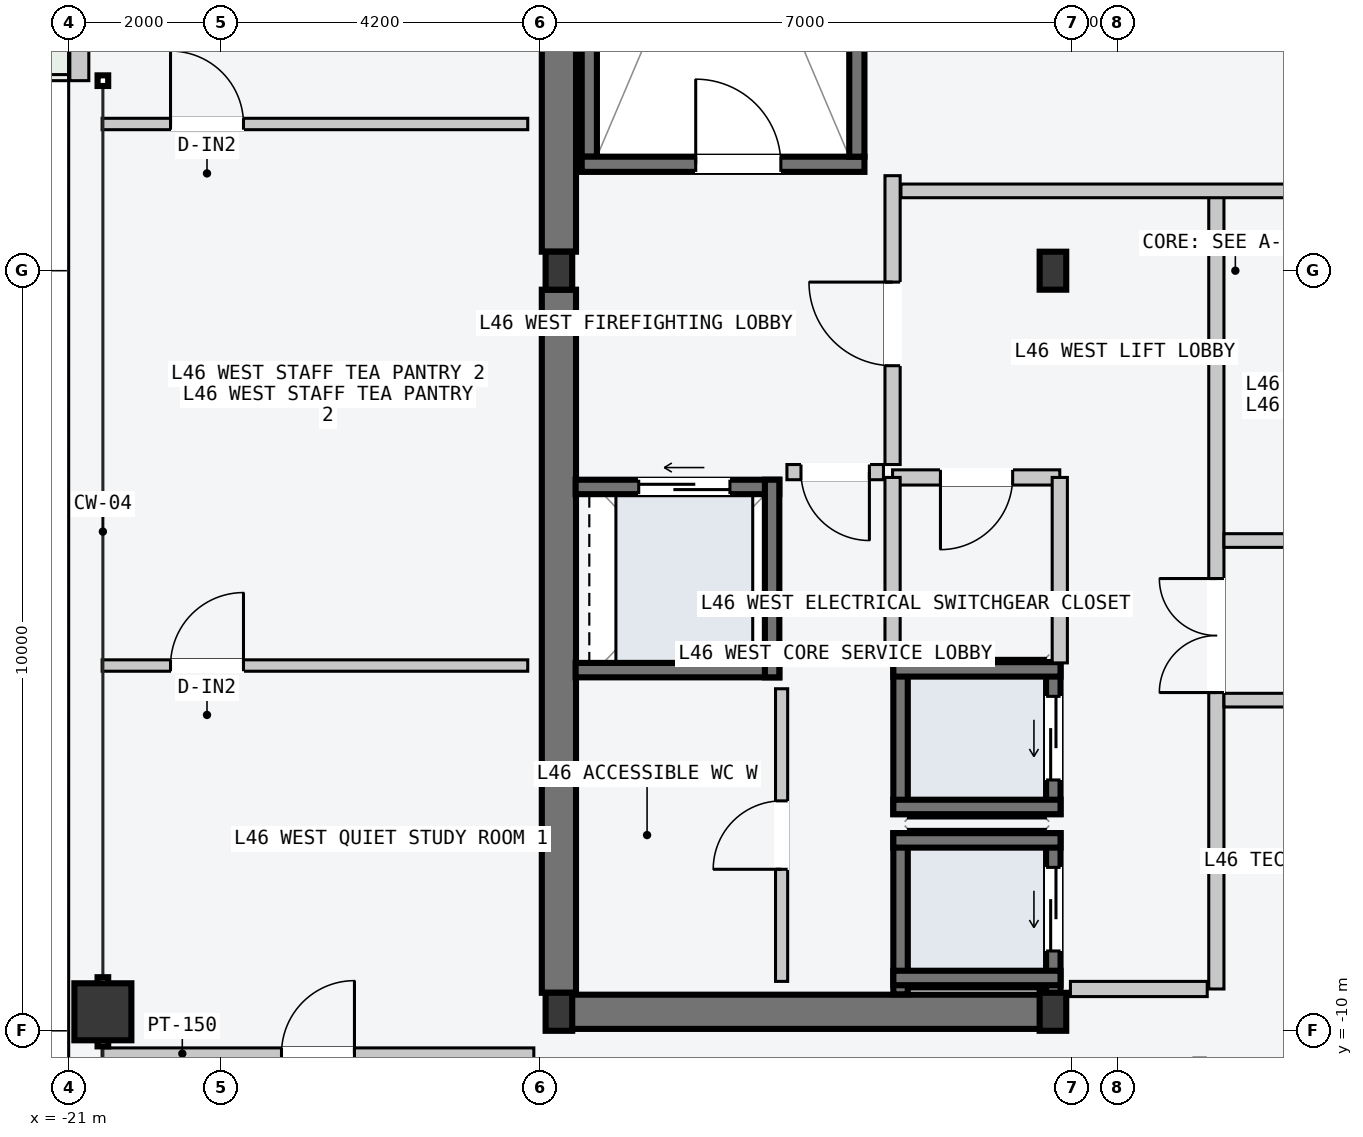
"""IFC4 building model, lengths in metres.
Left out: names, types, materials, properties, quantities, classifications, styles, units other than length and angle.
Written with IfcOpenShell. Run it as: python <this file> out.ifc"""

import sys

from ifc_helpers import new_model, si_unit, direction, frame, frame_2d, origin, origin_2d, place, context, subcontext, project, spatial, rectangle, hollow_rectangle, i_section, extrude, element, fill, save


model = new_model("IFC4")
c1 = context("Model", 3, precision=1e-05, world=origin(), true_north=direction((0.0, 1.0)))
c2 = subcontext(c1, "Body", "Model", "MODEL_VIEW")
j1 = project(units=[si_unit("LENGTHUNIT", "METRE"), si_unit("PLANEANGLEUNIT", "RADIAN")], contexts=[c1])
p1 = place(None, origin())
s1 = spatial("IfcSite", under=j1, at=p1, CompositionType="ELEMENT")
p2 = place(p1, origin())
s2 = spatial("IfcBuilding", under=s1, at=p2, CompositionType="ELEMENT")
p3 = place(p2, frame((0.0, 0.0, 176.7)))
s3 = spatial("IfcBuildingStorey", under=s2, at=p3, CompositionType="ELEMENT", Elevation=176.7)
p4 = place(p3, frame((-14.53, -9.75, -0.2), z_axis=(0.0, 0.0, 1.0), x_axis=(1.0, 0.0, 0.0)))
e1 = element("IfcWall", 1, at=p4, inside=s3, PredefinedType="SHEAR", context=c2, shape_type="SweptSolid", body=[
    extrude(rectangle(XDim=6.46, YDim=0.45, at=frame_2d((3.23, 0.0))), origin(), (0.0, 0.0, 1.0), 3.6),
])
for number, where, z_axis, x_axis in (
    (2, (-14.55, -9.5, -0.2), (0.0, 0.0, 1.0), (0.0, 1.0, 0.0)),
    (3, (-14.55, 0.25, -0.2), (0.0, 0.0, 1.0), (0.0, 1.0, 0.0)),
):
    element("IfcWall", number, at=place(p3, frame(where, z_axis=z_axis, x_axis=x_axis)), inside=s3, PredefinedType="SHEAR", context=c2, shape_type="SweptSolid", body=[
        extrude(rectangle(XDim=9.25, YDim=0.45, at=frame_2d((4.625, 0.0))), origin(), (0.0, 0.0, 1.0), 3.6),
    ])
p5 = place(p3, frame((-14.15, 1.5, -0.2), z_axis=(0.0, 0.0, 1.0), x_axis=(0.0, 1.0, 0.0)))
e4 = element("IfcWall", 4, at=p5, inside=s3, PredefinedType="SOLIDWALL", context=c2, shape_type="SweptSolid", body=[
    extrude(rectangle(XDim=7.8, YDim=0.2, at=frame_2d((3.9, 0.0))), origin(), (0.0, 0.0, 1.0), 3.6),
])
p6 = place(p3, frame((-14.25, 1.4, -0.2), z_axis=(0.0, 0.0, 1.0), x_axis=(1.0, 0.0, 0.0)))
e5 = element("IfcWall", 5, at=p6, inside=s3, PredefinedType="SOLIDWALL", context=c2, shape_type="SweptSolid", body=[
    extrude(rectangle(XDim=3.72, YDim=0.2, at=frame_2d((1.86, 0.0))), origin(), (0.0, 0.0, 1.0), 3.6),
])
p7 = place(p6, frame((1.5, 0.0, 0.2)))
e6 = element("IfcOpeningElement", 6, at=p7, cuts=e5, PredefinedType="OPENING", context=c2, shape_type="SweptSolid", body=[
    extrude(rectangle(XDim=1.12, YDim=2.18, at=frame_2d((0.56, 1.09))), frame((0.0, 0.11, 0.0), z_axis=(0.0, -1.0, 0.0), x_axis=(1.0, 0.0, 0.0)), (0.0, 0.0, 1.0), 0.22),
])
p8 = place(p3, frame((-10.63, 1.5, -0.2), z_axis=(0.0, 0.0, 1.0), x_axis=(0.0, 1.0, 0.0)))
e7 = element("IfcWall", 7, at=p8, inside=s3, PredefinedType="SOLIDWALL", context=c2, shape_type="SweptSolid", body=[
    extrude(rectangle(XDim=7.8, YDim=0.2, at=frame_2d((3.9, 0.0))), origin(), (0.0, 0.0, 1.0), 3.6),
])
for number, where, z_axis, x_axis in (
    (8, (-14.55, -9.75, 0.0), (0.0, 0.0, 1.0), (1.0, 0.0, 0.0)),
    (9, (-14.55, 0.0, 0.0), (0.0, 0.0, 1.0), (1.0, 0.0, 0.0)),
    (10, (-8.05, -9.75, 0.0), (0.0, 0.0, 1.0), (1.0, 0.0, 0.0)),
    (11, (-8.05, 0.0, 0.0), (0.0, 0.0, 1.0), (1.0, 0.0, 0.0)),
):
    element("IfcColumn", number, at=place(p3, frame(where, z_axis=z_axis, x_axis=x_axis)), inside=s3, PredefinedType="COLUMN", context=c2, shape_type="SweptSolid", body=[
        extrude(i_section(OverallWidth=0.35, OverallDepth=0.5, WebThickness=0.02, FlangeThickness=0.032, at=origin_2d()), origin(), (0.0, 0.0, 1.0), 3.6),
    ])
p9 = place(p3, frame((-20.55, -9.75, 0.0), z_axis=(0.0, 0.0, 1.0), x_axis=(0.0, 1.0, 0.0)))
e12 = element("IfcColumn", 12, at=p9, inside=s3, PredefinedType="COLUMN", context=c2, shape_type="SweptSolid", body=[
    extrude(hollow_rectangle(XDim=0.75, YDim=0.75, WallThickness=0.032, at=origin_2d()), origin(), (0.0, 0.0, 1.0), 3.6),
])
p10 = place(p3, frame((-20.86, 2.5, 0.0), z_axis=(0.0, 0.0, 1.0), x_axis=(0.0, 1.0, 0.0)))
e13 = element("IfcWall", 13, at=p10, inside=s3, PredefinedType="STANDARD", context=c2, shape_type="SweptSolid", body=[
    extrude(rectangle(XDim=6.855, YDim=0.25, at=frame_2d((3.427, 0.0))), origin(), (0.0, 0.0, 1.0), 3.4),
])
p11 = place(p10, frame((1.7, 0.0, 0.0)))
e14 = element("IfcOpeningElement", 14, at=p11, cuts=e13, PredefinedType="OPENING", context=c2, shape_type="SweptSolid", body=[
    extrude(rectangle(XDim=1.6, YDim=2.2, at=frame_2d((0.8, 1.1))), frame((0.0, 0.135, 0.0), z_axis=(0.0, -1.0, 0.0), x_axis=(1.0, 0.0, 0.0)), (0.0, 0.0, 1.0), 0.27),
])
p12 = place(p10, frame((4.1, 0.0, 0.85)))
e15 = element("IfcOpeningElement", 15, at=p12, cuts=e13, PredefinedType="OPENING", context=c2, shape_type="SweptSolid", body=[
    extrude(rectangle(XDim=2.0, YDim=2.1, at=frame_2d((1.0, 1.05))), frame((0.0, 0.135, 0.0), z_axis=(0.0, -1.0, 0.0), x_axis=(1.0, 0.0, 0.0)), (0.0, 0.0, 1.0), 0.27),
])
p13 = place(p3, frame((-8.045, -9.52, -0.2), z_axis=(0.0, 0.0, 1.0), x_axis=(0.0, 1.0, 0.0)))
e16 = element("IfcWall", 16, at=p13, inside=s3, PredefinedType="SOLIDWALL", context=c2, shape_type="SweptSolid", body=[
    extrude(rectangle(XDim=2.12, YDim=0.19, at=frame_2d((1.06, 0.0))), origin(), (0.0, 0.0, 1.0), 3.6),
])
p14 = place(p13, frame((0.57, 0.0, 0.2)))
e17 = element("IfcOpeningElement", 17, at=p14, cuts=e16, PredefinedType="OPENING", context=c2, shape_type="SweptSolid", body=[
    extrude(rectangle(XDim=1.1, YDim=2.2, at=frame_2d((0.55, 1.1))), frame((0.0, 0.105, 0.0), z_axis=(0.0, -1.0, 0.0), x_axis=(1.0, 0.0, 0.0)), (0.0, 0.0, 1.0), 0.21),
])
p15 = place(p3, frame((-10.055, -9.52, -0.2), z_axis=(0.0, 0.0, 1.0), x_axis=(0.0, 1.0, 0.0)))
e18 = element("IfcWall", 18, at=p15, inside=s3, PredefinedType="SOLIDWALL", context=c2, shape_type="SweptSolid", body=[
    extrude(rectangle(XDim=2.12, YDim=0.19, at=frame_2d((1.06, 0.0))), origin(), (0.0, 0.0, 1.0), 3.6),
])
for number, where, z_axis, x_axis in (
    (19, (-10.15, -7.495, -0.2), (0.0, 0.0, 1.0), (1.0, 0.0, 0.0)),
    (20, (-10.15, -9.305, -0.2), (0.0, 0.0, 1.0), (1.0, 0.0, 0.0)),
):
    element("IfcWall", number, at=place(p3, frame(where, z_axis=z_axis, x_axis=x_axis)), inside=s3, PredefinedType="SOLIDWALL", context=c2, shape_type="SweptSolid", body=[
        extrude(rectangle(XDim=2.2, YDim=0.19, at=frame_2d((1.1, 0.0))), origin(), (0.0, 0.0, 1.0), 3.6),
    ])
p16 = place(p3, frame((-8.045, -7.15, -0.2), z_axis=(0.0, 0.0, 1.0), x_axis=(0.0, 1.0, 0.0)))
e21 = element("IfcWall", 21, at=p16, inside=s3, PredefinedType="SOLIDWALL", context=c2, shape_type="SweptSolid", body=[
    extrude(rectangle(XDim=2.0, YDim=0.19, at=frame_2d((1.0, 0.0))), origin(), (0.0, 0.0, 1.0), 3.6),
])
p17 = place(p16, frame((0.45, 0.0, 0.2)))
e22 = element("IfcOpeningElement", 22, at=p17, cuts=e21, PredefinedType="OPENING", context=c2, shape_type="SweptSolid", body=[
    extrude(rectangle(XDim=1.1, YDim=2.2, at=frame_2d((0.55, 1.1))), frame((0.0, 0.105, 0.0), z_axis=(0.0, -1.0, 0.0), x_axis=(1.0, 0.0, 0.0)), (0.0, 0.0, 1.0), 0.21),
])
p18 = place(p3, frame((-10.055, -7.15, -0.2), z_axis=(0.0, 0.0, 1.0), x_axis=(0.0, 1.0, 0.0)))
e23 = element("IfcWall", 23, at=p18, inside=s3, PredefinedType="SOLIDWALL", context=c2, shape_type="SweptSolid", body=[
    extrude(rectangle(XDim=2.0, YDim=0.19, at=frame_2d((1.0, 0.0))), origin(), (0.0, 0.0, 1.0), 3.6),
])
for number, where, z_axis, x_axis in (
    (24, (-10.15, -5.245, -0.2), (0.0, 0.0, 1.0), (1.0, 0.0, 0.0)),
    (25, (-10.15, -7.055, -0.2), (0.0, 0.0, 1.0), (1.0, 0.0, 0.0)),
):
    element("IfcWall", number, at=place(p3, frame(where, z_axis=z_axis, x_axis=x_axis)), inside=s3, PredefinedType="SOLIDWALL", context=c2, shape_type="SweptSolid", body=[
        extrude(rectangle(XDim=2.2, YDim=0.19, at=frame_2d((1.1, 0.0))), origin(), (0.0, 0.0, 1.0), 3.6),
    ])
p19 = place(p3, frame((-14.33, -2.845, -0.2), z_axis=(0.0, 0.0, 1.0), x_axis=(1.0, 0.0, 0.0)))
e26 = element("IfcWall", 26, at=p19, inside=s3, PredefinedType="SOLIDWALL", context=c2, shape_type="SweptSolid", body=[
    extrude(rectangle(XDim=2.68, YDim=0.19, at=frame_2d((1.34, 0.0))), origin(), (0.0, 0.0, 1.0), 3.6),
])
p20 = place(p19, frame((0.83, 0.0, 0.2)))
e27 = element("IfcOpeningElement", 27, at=p20, cuts=e26, PredefinedType="OPENING", context=c2, shape_type="SweptSolid", body=[
    extrude(rectangle(XDim=1.2, YDim=2.2, at=frame_2d((0.6, 1.1))), frame((0.0, 0.105, 0.0), z_axis=(0.0, -1.0, 0.0), x_axis=(1.0, 0.0, 0.0)), (0.0, 0.0, 1.0), 0.21),
])
p21 = place(p3, frame((-14.33, -5.255, -0.2), z_axis=(0.0, 0.0, 1.0), x_axis=(1.0, 0.0, 0.0)))
e28 = element("IfcWall", 28, at=p21, inside=s3, PredefinedType="SOLIDWALL", context=c2, shape_type="SweptSolid", body=[
    extrude(rectangle(XDim=2.68, YDim=0.19, at=frame_2d((1.34, 0.0))), origin(), (0.0, 0.0, 1.0), 3.6),
])
p22 = place(p3, frame((-11.745, -5.35, -0.2), z_axis=(0.0, 0.0, 1.0), x_axis=(0.0, 1.0, 0.0)))
e29 = element("IfcWall", 29, at=p22, inside=s3, PredefinedType="SOLIDWALL", context=c2, shape_type="SweptSolid", body=[
    extrude(rectangle(XDim=2.6, YDim=0.19, at=frame_2d((1.3, 0.0))), origin(), (0.0, 0.0, 1.0), 3.6),
])
p23 = place(p3, frame((-5.9, -9.45, 0.0), z_axis=(0.0, 0.0, 1.0), x_axis=(0.0, 1.0, 0.0)))
e30 = element("IfcWall", 30, at=p23, inside=s3, PredefinedType="PARTITIONING", context=c2, shape_type="SweptSolid", body=[
    extrude(rectangle(XDim=10.5, YDim=0.2, at=frame_2d((5.25, 0.0))), origin(), (0.0, 0.0, 1.0), 3.4),
])
p24 = place(p23, frame((3.9, 0.0, 0.0)))
e31 = element("IfcOpeningElement", 31, at=p24, cuts=e30, PredefinedType="OPENING", context=c2, shape_type="SweptSolid", body=[
    extrude(rectangle(XDim=1.5, YDim=2.2, at=frame_2d((0.75, 1.1))), frame((0.0, 0.11, 0.0), z_axis=(0.0, -1.0, 0.0), x_axis=(1.0, 0.0, 0.0)), (0.0, 0.0, 1.0), 0.22),
])
p25 = place(p3, frame((-6.02, -9.45, 0.0), z_axis=(0.0, 0.0, 1.0), x_axis=(-1.0, 0.0, 0.0)))
e32 = element("IfcWall", 32, at=p25, inside=s3, PredefinedType="PARTITIONING", context=c2, shape_type="SweptSolid", body=[
    extrude(rectangle(XDim=1.8, YDim=0.2, at=frame_2d((0.9, 0.0))), origin(), (0.0, 0.0, 1.0), 3.4),
])
p26 = place(p3, frame((-10.16, -2.55, 0.0), z_axis=(0.0, 0.0, 1.0), x_axis=(0.0, 1.0, 0.0)))
e33 = element("IfcWall", 33, at=p26, inside=s3, PredefinedType="PARTITIONING", context=c2, shape_type="SweptSolid", body=[
    extrude(rectangle(XDim=3.8, YDim=0.2, at=frame_2d((1.9, 0.0))), origin(), (0.0, 0.0, 1.0), 3.4),
])
p27 = place(p26, frame((1.3, 0.0, 0.0)))
e34 = element("IfcOpeningElement", 34, at=p27, cuts=e33, PredefinedType="OPENING", context=c2, shape_type="SweptSolid", body=[
    extrude(rectangle(XDim=1.1, YDim=2.15, at=frame_2d((0.55, 1.075))), frame((0.0, 0.11, 0.0), z_axis=(0.0, -1.0, 0.0), x_axis=(1.0, 0.0, 0.0)), (0.0, 0.0, 1.0), 0.22),
])
p28 = place(p3, frame((-10.28, -2.65, 0.0), z_axis=(0.0, 0.0, 1.0), x_axis=(-1.0, 0.0, 0.0)))
e35 = element("IfcWall", 35, at=p28, inside=s3, PredefinedType="PARTITIONING", context=c2, shape_type="SweptSolid", body=[
    extrude(rectangle(XDim=1.27, YDim=0.2, at=frame_2d((0.635, 0.0))), origin(), (0.0, 0.0, 1.0), 3.4),
])
p29 = place(p28, frame((0.185, 0.0, 0.0)))
e36 = element("IfcOpeningElement", 36, at=p29, cuts=e35, PredefinedType="OPENING", context=c2, shape_type="SweptSolid", body=[
    extrude(rectangle(XDim=0.9, YDim=2.15, at=frame_2d((0.45, 1.075))), frame((0.0, 0.11, 0.0), z_axis=(0.0, -1.0, 0.0), x_axis=(1.0, 0.0, 0.0)), (0.0, 0.0, 1.0), 0.22),
])
p30 = place(p3, frame((-7.96, -2.72, 0.0), z_axis=(0.0, 0.0, 1.0), x_axis=(-1.0, 0.0, 0.0)))
e37 = element("IfcWall", 37, at=p30, inside=s3, PredefinedType="PARTITIONING", context=c2, shape_type="SweptSolid", body=[
    extrude(rectangle(XDim=2.2, YDim=0.2, at=frame_2d((1.1, 0.0))), origin(), (0.0, 0.0, 1.0), 3.4),
])
p31 = place(p30, frame((0.62, 0.0, 0.0)))
e38 = element("IfcOpeningElement", 38, at=p31, cuts=e37, PredefinedType="OPENING", context=c2, shape_type="SweptSolid", body=[
    extrude(rectangle(XDim=0.95, YDim=2.1, at=frame_2d((0.475, 1.05))), frame((0.0, 0.11, 0.0), z_axis=(0.0, -1.0, 0.0), x_axis=(1.0, 0.0, 0.0)), (0.0, 0.0, 1.0), 0.22),
])
for number, where, z_axis, x_axis in (
    (39, (-7.96, -5.16, 0.0), (0.0, 0.0, 1.0), (0.0, 1.0, 0.0)),
    (40, (-10.16, -5.16, 0.0), (0.0, 0.0, 1.0), (0.0, 1.0, 0.0)),
):
    element("IfcWall", number, at=place(p3, frame(where, z_axis=z_axis, x_axis=x_axis)), inside=s3, PredefinedType="PARTITIONING", context=c2, shape_type="SweptSolid", body=[
        extrude(rectangle(XDim=2.44, YDim=0.2, at=frame_2d((1.22, 0.0))), origin(), (0.0, 0.0, 1.0), 3.4),
    ])
p32 = place(p3, frame((-11.62, -9.35, 0.0), z_axis=(0.0, 0.0, 1.0), x_axis=(0.0, 1.0, 0.0)))
e41 = element("IfcWall", 41, at=p32, inside=s3, PredefinedType="PARTITIONING", context=c2, shape_type="SweptSolid", body=[
    extrude(rectangle(XDim=3.85, YDim=0.16, at=frame_2d((1.925, 0.0))), origin(), (0.0, 0.0, 1.0), 3.4),
])
p33 = place(p32, frame((1.475, 0.0, 0.0)))
e42 = element("IfcOpeningElement", 42, at=p33, cuts=e41, PredefinedType="OPENING", context=c2, shape_type="SweptSolid", body=[
    extrude(rectangle(XDim=0.9, YDim=2.15, at=frame_2d((0.45, 1.075))), frame((0.0, 0.09, 0.0), z_axis=(0.0, -1.0, 0.0), x_axis=(1.0, 0.0, 0.0)), (0.0, 0.0, 1.0), 0.18),
])
p34 = place(p3, frame((-10.05, 1.05, 0.0), z_axis=(0.0, 0.0, 1.0), x_axis=(1.0, 0.0, 0.0)))
e43 = element("IfcWall", 43, at=p34, inside=s3, PredefinedType="PARTITIONING", context=c2, shape_type="SweptSolid", body=[
    extrude(rectangle(XDim=8.79, YDim=0.18, at=frame_2d((4.395, 0.0))), origin(), (0.0, 0.0, 1.0), 3.4),
])
for number, where, z_axis, x_axis in (
    (44, (-5.8, -3.55, 0.0), (0.0, 0.0, 1.0), (1.0, 0.0, 0.0)),
    (45, (-5.8, -5.65, 0.0), (0.0, 0.0, 1.0), (1.0, 0.0, 0.0)),
):
    element("IfcWall", number, at=place(p3, frame(where, z_axis=z_axis, x_axis=x_axis)), inside=s3, PredefinedType="PARTITIONING", context=c2, shape_type="SweptSolid", body=[
        extrude(rectangle(XDim=4.54, YDim=0.18, at=frame_2d((2.27, 0.0))), origin(), (0.0, 0.0, 1.0), 3.4),
    ])
p35 = place(p3, frame((-20.56, -10.3, 0.0), z_axis=(0.0, 0.0, 1.0), x_axis=(1.0, 0.0, 0.0)))
e46 = element("IfcWall", 46, at=p35, inside=s3, PredefinedType="PARTITIONING", context=c2, shape_type="SweptSolid", body=[
    extrude(rectangle(XDim=5.68, YDim=0.15, at=frame_2d((2.84, 0.0))), origin(), (0.0, 0.0, 1.0), 3.4),
])
p36 = place(p35, frame((2.36, 0.0, 0.0)))
e47 = element("IfcOpeningElement", 47, at=p36, cuts=e46, PredefinedType="OPENING", context=c2, shape_type="SweptSolid", body=[
    extrude(rectangle(XDim=0.96, YDim=2.18, at=frame_2d((0.48, 1.09))), frame((0.0, 0.085, 0.0), z_axis=(0.0, -1.0, 0.0), x_axis=(1.0, 0.0, 0.0)), (0.0, 0.0, 1.0), 0.17),
])
p37 = place(p3, frame((-20.56, -5.195, 0.0), z_axis=(0.0, 0.0, 1.0), x_axis=(1.0, 0.0, 0.0)))
e48 = element("IfcWall", 48, at=p37, inside=s3, PredefinedType="PARTITIONING", context=c2, shape_type="SweptSolid", body=[
    extrude(rectangle(XDim=5.6, YDim=0.15, at=frame_2d((2.8, 0.0))), origin(), (0.0, 0.0, 1.0), 3.4),
])
p38 = place(p37, frame((0.9, 0.0, 0.0)))
e49 = element("IfcOpeningElement", 49, at=p38, cuts=e48, PredefinedType="OPENING", context=c2, shape_type="SweptSolid", body=[
    extrude(rectangle(XDim=0.96, YDim=2.18, at=frame_2d((0.48, 1.09))), frame((0.0, 0.085, 0.0), z_axis=(0.0, -1.0, 0.0), x_axis=(1.0, 0.0, 0.0)), (0.0, 0.0, 1.0), 0.17),
])
p39 = place(p3, frame((-20.56, 1.93, 0.0), z_axis=(0.0, 0.0, 1.0), x_axis=(1.0, 0.0, 0.0)))
e50 = element("IfcWall", 50, at=p39, inside=s3, PredefinedType="PARTITIONING", context=c2, shape_type="SweptSolid", body=[
    extrude(rectangle(XDim=5.6, YDim=0.15, at=frame_2d((2.8, 0.0))), origin(), (0.0, 0.0, 1.0), 3.4),
])
p40 = place(p39, frame((0.9, 0.0, 0.0)))
e51 = element("IfcOpeningElement", 51, at=p40, cuts=e50, PredefinedType="OPENING", context=c2, shape_type="SweptSolid", body=[
    extrude(rectangle(XDim=0.96, YDim=2.18, at=frame_2d((0.48, 1.09))), frame((0.0, 0.085, 0.0), z_axis=(0.0, -1.0, 0.0), x_axis=(1.0, 0.0, 0.0)), (0.0, 0.0, 1.0), 0.17),
])
p41 = place(p7, origin())
e52 = element("IfcDoor", 52, at=p41, inside=s3, OperationType="SINGLE_SWING_LEFT", PredefinedType="DOOR", context=c2, shape_type="SweptSolid", body=[
    extrude(rectangle(XDim=1.12, YDim=2.18, at=frame_2d((0.56, 1.09))), frame((0.0, 0.025, 0.0), z_axis=(0.0, -1.0, 0.0), x_axis=(1.0, 0.0, 0.0)), (0.0, 0.0, 1.0), 0.05),
])
fill(e6, e52)
p42 = place(p14, origin())
e53 = element("IfcDoor", 53, at=p42, inside=s3, OperationType="SLIDING_TO_LEFT", PredefinedType="DOOR", context=c2, shape_type="SweptSolid", body=[
    extrude(rectangle(XDim=1.1, YDim=2.2, at=frame_2d((0.55, 1.1))), frame((0.0, 0.025, 0.0), z_axis=(0.0, -1.0, 0.0), x_axis=(1.0, 0.0, 0.0)), (0.0, 0.0, 1.0), 0.05),
])
fill(e17, e53)
p43 = place(p17, origin())
e54 = element("IfcDoor", 54, at=p43, inside=s3, OperationType="SLIDING_TO_LEFT", PredefinedType="DOOR", context=c2, shape_type="SweptSolid", body=[
    extrude(rectangle(XDim=1.1, YDim=2.2, at=frame_2d((0.55, 1.1))), frame((0.0, 0.025, 0.0), z_axis=(0.0, -1.0, 0.0), x_axis=(1.0, 0.0, 0.0)), (0.0, 0.0, 1.0), 0.05),
])
fill(e22, e54)
p44 = place(p20, origin())
e55 = element("IfcDoor", 55, at=p44, inside=s3, OperationType="SLIDING_TO_LEFT", PredefinedType="DOOR", context=c2, shape_type="SweptSolid", body=[
    extrude(rectangle(XDim=1.2, YDim=2.2, at=frame_2d((0.6, 1.1))), frame((0.0, 0.025, 0.0), z_axis=(0.0, -1.0, 0.0), x_axis=(1.0, 0.0, 0.0)), (0.0, 0.0, 1.0), 0.05),
])
fill(e27, e55)
p45 = place(p24, origin())
e56 = element("IfcDoor", 56, at=p45, inside=s3, OperationType="DOUBLE_DOOR_SINGLE_SWING", PredefinedType="DOOR", context=c2, shape_type="SweptSolid", body=[
    extrude(rectangle(XDim=1.5, YDim=2.2, at=frame_2d((0.75, 1.1))), frame((0.0, 0.025, 0.0), z_axis=(0.0, -1.0, 0.0), x_axis=(1.0, 0.0, 0.0)), (0.0, 0.0, 1.0), 0.05),
])
fill(e31, e56)
p46 = place(p27, origin())
e57 = element("IfcDoor", 57, at=p46, inside=s3, OperationType="SINGLE_SWING_RIGHT", PredefinedType="DOOR", context=c2, shape_type="SweptSolid", body=[
    extrude(rectangle(XDim=1.1, YDim=2.15, at=frame_2d((0.55, 1.075))), frame((0.0, 0.025, 0.0), z_axis=(0.0, -1.0, 0.0), x_axis=(1.0, 0.0, 0.0)), (0.0, 0.0, 1.0), 0.05),
])
fill(e34, e57)
p47 = place(p29, origin())
e58 = element("IfcDoor", 58, at=p47, inside=s3, OperationType="SINGLE_SWING_LEFT", PredefinedType="DOOR", context=c2, shape_type="SweptSolid", body=[
    extrude(rectangle(XDim=0.9, YDim=2.15, at=frame_2d((0.45, 1.075))), frame((0.0, 0.025, 0.0), z_axis=(0.0, -1.0, 0.0), x_axis=(1.0, 0.0, 0.0)), (0.0, 0.0, 1.0), 0.05),
])
fill(e36, e58)
p48 = place(p31, origin())
e59 = element("IfcDoor", 59, at=p48, inside=s3, OperationType="SINGLE_SWING_RIGHT", PredefinedType="DOOR", context=c2, shape_type="SweptSolid", body=[
    extrude(rectangle(XDim=0.95, YDim=2.1, at=frame_2d((0.475, 1.05))), frame((0.0, 0.025, 0.0), z_axis=(0.0, -1.0, 0.0), x_axis=(1.0, 0.0, 0.0)), (0.0, 0.0, 1.0), 0.05),
])
fill(e38, e59)
p49 = place(p33, origin())
e60 = element("IfcDoor", 60, at=p49, inside=s3, OperationType="SINGLE_SWING_LEFT", PredefinedType="DOOR", context=c2, shape_type="SweptSolid", body=[
    extrude(rectangle(XDim=0.9, YDim=2.15, at=frame_2d((0.45, 1.075))), frame((0.0, 0.025, 0.0), z_axis=(0.0, -1.0, 0.0), x_axis=(1.0, 0.0, 0.0)), (0.0, 0.0, 1.0), 0.05),
])
fill(e42, e60)
p50 = place(p36, origin())
e61 = element("IfcDoor", 61, at=p50, inside=s3, OperationType="SINGLE_SWING_RIGHT", PredefinedType="DOOR", context=c2, shape_type="SweptSolid", body=[
    extrude(rectangle(XDim=0.96, YDim=2.18, at=frame_2d((0.48, 1.09))), frame((0.0, 0.025, 0.0), z_axis=(0.0, -1.0, 0.0), x_axis=(1.0, 0.0, 0.0)), (0.0, 0.0, 1.0), 0.05),
])
fill(e47, e61)
p51 = place(p38, origin())
e62 = element("IfcDoor", 62, at=p51, inside=s3, OperationType="SINGLE_SWING_RIGHT", PredefinedType="DOOR", context=c2, shape_type="SweptSolid", body=[
    extrude(rectangle(XDim=0.96, YDim=2.18, at=frame_2d((0.48, 1.09))), frame((0.0, 0.025, 0.0), z_axis=(0.0, -1.0, 0.0), x_axis=(1.0, 0.0, 0.0)), (0.0, 0.0, 1.0), 0.05),
])
fill(e49, e62)
p52 = place(p40, origin())
e63 = element("IfcDoor", 63, at=p52, inside=s3, OperationType="SINGLE_SWING_LEFT", PredefinedType="DOOR", context=c2, shape_type="SweptSolid", body=[
    extrude(rectangle(XDim=0.96, YDim=2.18, at=frame_2d((0.48, 1.09))), frame((0.0, 0.025, 0.0), z_axis=(0.0, -1.0, 0.0), x_axis=(1.0, 0.0, 0.0)), (0.0, 0.0, 1.0), 0.05),
])
fill(e51, e63)
save(model, sys.argv[1])
